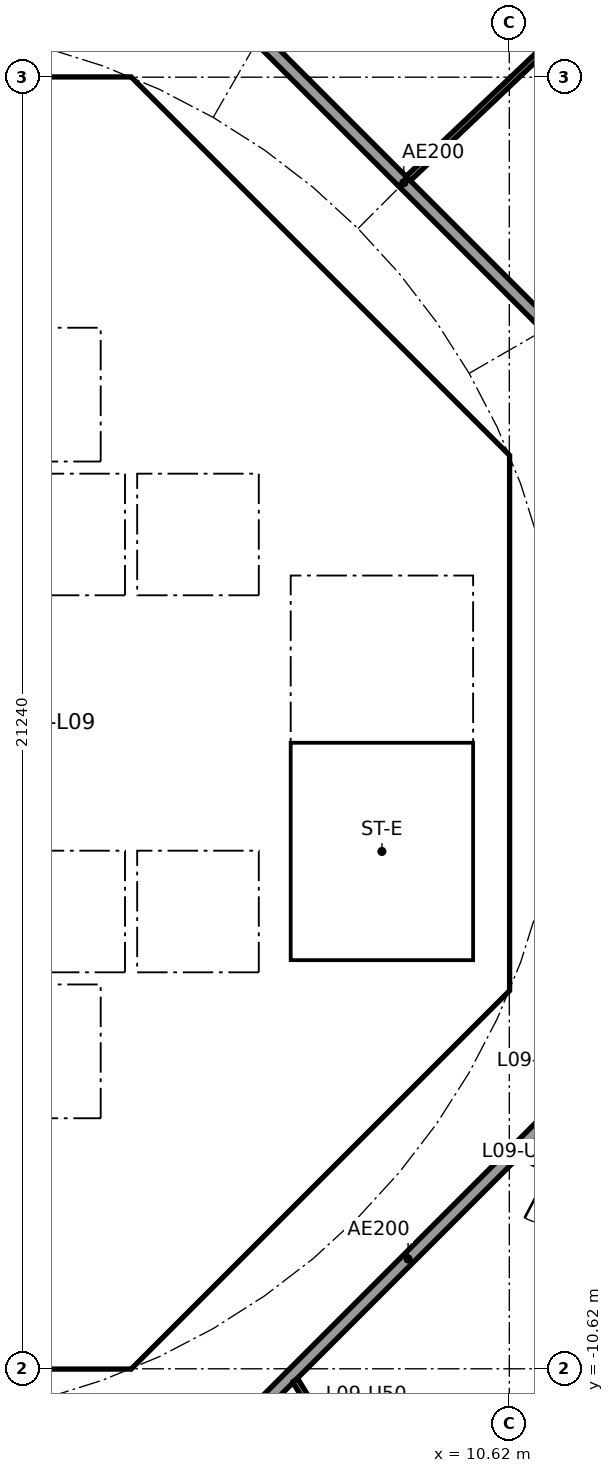
"""IFC4 building model, lengths in metres.
Left out: names, types, materials, properties, quantities, classifications, styles, units other than length and angle.
Written with IfcOpenShell. Run it as: python <this file> out.ifc"""

import sys

from ifc_helpers import new_model, si_unit, direction, frame, frame_2d, origin, place, context, subcontext, project, spatial, polyline, rectangle, outline, extrude, element, fill, save


model = new_model("IFC4")
c1 = context("Model", 3, precision=1e-05, world=origin(), true_north=direction((0.0, 1.0)))
c2 = subcontext(c1, "Body", "Model", "MODEL_VIEW")
j1 = project(units=[si_unit("LENGTHUNIT", "METRE"), si_unit("PLANEANGLEUNIT", "RADIAN")], contexts=[c1])
p1 = place(None, origin())
s1 = spatial("IfcSite", under=j1, at=p1, CompositionType="ELEMENT")
p2 = place(p1, origin())
s2 = spatial("IfcBuilding", under=s1, at=p2, CompositionType="ELEMENT")
p3 = place(p2, frame((0.0, 0.0, 41.8)))
s3 = spatial("IfcBuildingStorey", under=s2, at=p3, CompositionType="ELEMENT", Elevation=41.8)
p4 = place(p3, frame((9.988, 4.613, 0.0), z_axis=(0.0, 0.0, 1.0), x_axis=(-0.707106781187, 0.707106781187, 0.0)))
e1 = element("IfcWall", 1, at=p4, inside=s3, PredefinedType="SHEAR", context=c2, shape_type="SweptSolid", body=[
    extrude(rectangle(XDim=7.602, YDim=0.6, at=frame_2d((3.801, 0.0))), origin(), (0.0, 0.0, 1.0), 3.44),
])
p5 = place(p4, frame((3.201, 0.0, 0.0)))
e2 = element("IfcOpeningElement", 2, at=p5, cuts=e1, PredefinedType="OPENING", context=c2, shape_type="SweptSolid", body=[
    extrude(rectangle(XDim=1.2, YDim=2.1, at=frame_2d((0.6, 1.05))), frame((0.0, 0.31, 0.0), z_axis=(0.0, -1.0, 0.0), x_axis=(1.0, 0.0, 0.0)), (0.0, 0.0, 1.0), 0.62),
])
p6 = place(p3, frame((4.613, -9.988, 0.0), z_axis=(0.0, 0.0, 1.0), x_axis=(0.707106781187, 0.707106781187, 0.0)))
e3 = element("IfcWall", 3, at=p6, inside=s3, PredefinedType="SHEAR", context=c2, shape_type="SweptSolid", body=[
    extrude(rectangle(XDim=7.602, YDim=0.6, at=frame_2d((3.801, 0.0))), origin(), (0.0, 0.0, 1.0), 3.44),
])
p7 = place(p6, frame((3.201, 0.0, 0.0)))
e4 = element("IfcOpeningElement", 4, at=p7, cuts=e3, PredefinedType="OPENING", context=c2, shape_type="SweptSolid", body=[
    extrude(rectangle(XDim=1.2, YDim=2.1, at=frame_2d((0.6, 1.05))), frame((0.0, 0.31, 0.0), z_axis=(0.0, -1.0, 0.0), x_axis=(1.0, 0.0, 0.0)), (0.0, 0.0, 1.0), 0.62),
])
p8 = place(p3, frame((4.0, 4.3, 0.0), z_axis=(0.0, 0.0, 1.0), x_axis=(0.0, 1.0, 0.0)))
e5 = element("IfcWall", 5, at=p8, inside=s3, PredefinedType="SOLIDWALL", context=c2, shape_type="SweptSolid", body=[
    extrude(rectangle(XDim=2.2, YDim=0.2, at=frame_2d((1.1, 0.0))), origin(), (0.0, 0.0, 1.0), 3.44),
])
p9 = place(p8, frame((0.55, 0.0, 0.0)))
e6 = element("IfcOpeningElement", 6, at=p9, cuts=e5, PredefinedType="OPENING", context=c2, shape_type="SweptSolid", body=[
    extrude(rectangle(XDim=1.1, YDim=2.1, at=frame_2d((0.55, 1.05))), frame((0.0, 0.11, 0.0), z_axis=(0.0, -1.0, 0.0), x_axis=(1.0, 0.0, 0.0)), (0.0, 0.0, 1.0), 0.22),
])
p10 = place(p3, frame((-6.7, 2.0, 0.0), z_axis=(0.0, 0.0, 1.0), x_axis=(1.0, 0.0, 0.0)))
e7 = element("IfcWall", 7, at=p10, inside=s3, PredefinedType="SOLIDWALL", context=c2, shape_type="SweptSolid", body=[
    extrude(rectangle(XDim=13.4, YDim=0.2, at=frame_2d((6.7, 0.0))), origin(), (0.0, 0.0, 1.0), 3.44),
])
p11 = place(p10, frame((0.65, 0.0, 0.0)))
e8 = element("IfcOpeningElement", 8, at=p11, cuts=e7, PredefinedType="OPENING", context=c2, shape_type="SweptSolid", body=[
    extrude(rectangle(XDim=1.1, YDim=2.1, at=frame_2d((0.55, 1.05))), frame((0.0, 0.11, 0.0), z_axis=(0.0, -1.0, 0.0), x_axis=(1.0, 0.0, 0.0)), (0.0, 0.0, 1.0), 0.22),
])
p12 = place(p10, frame((2.85, 0.0, 0.0)))
e9 = element("IfcOpeningElement", 9, at=p12, cuts=e7, PredefinedType="OPENING", context=c2, shape_type="SweptSolid", body=[
    extrude(rectangle(XDim=1.1, YDim=2.1, at=frame_2d((0.55, 1.05))), frame((0.0, 0.11, 0.0), z_axis=(0.0, -1.0, 0.0), x_axis=(1.0, 0.0, 0.0)), (0.0, 0.0, 1.0), 0.22),
])
p13 = place(p10, frame((5.05, 0.0, 0.0)))
e10 = element("IfcOpeningElement", 10, at=p13, cuts=e7, PredefinedType="OPENING", context=c2, shape_type="SweptSolid", body=[
    extrude(rectangle(XDim=1.1, YDim=2.1, at=frame_2d((0.55, 1.05))), frame((0.0, 0.11, 0.0), z_axis=(0.0, -1.0, 0.0), x_axis=(1.0, 0.0, 0.0)), (0.0, 0.0, 1.0), 0.22),
])
p14 = place(p3, frame((6.7, 4.0, 0.0), z_axis=(0.0, 0.0, 1.0), x_axis=(1.0, 0.0, 0.0)))
e11 = element("IfcWall", 11, at=p14, inside=s3, PredefinedType="SOLIDWALL", context=c2, shape_type="SweptSolid", body=[
    extrude(rectangle(XDim=3.325, YDim=0.2, at=frame_2d((1.662, 0.0))), origin(), (0.0, 0.0, 1.0), 3.44),
])
p15 = place(p14, frame((1.25, 0.0, 0.0)))
e12 = element("IfcOpeningElement", 12, at=p15, cuts=e11, PredefinedType="OPENING", context=c2, shape_type="SweptSolid", body=[
    extrude(rectangle(XDim=1.1, YDim=2.1, at=frame_2d((0.55, 1.05))), frame((0.0, 0.11, 0.0), z_axis=(0.0, -1.0, 0.0), x_axis=(1.0, 0.0, 0.0)), (0.0, 0.0, 1.0), 0.22),
])
p16 = place(p3, frame((4.0, 7.025, 0.0), z_axis=(0.0, 0.0, 1.0), x_axis=(0.0, 1.0, 0.0)))
e13 = element("IfcWall", 13, at=p16, inside=s3, PredefinedType="SOLIDWALL", context=c2, shape_type="SweptSolid", body=[
    extrude(rectangle(XDim=3.0, YDim=0.2, at=frame_2d((1.5, 0.0))), origin(), (0.0, 0.0, 1.0), 3.44),
])
p17 = place(p16, frame((0.925, 0.0, 0.0)))
e14 = element("IfcOpeningElement", 14, at=p17, cuts=e13, PredefinedType="OPENING", context=c2, shape_type="SweptSolid", body=[
    extrude(rectangle(XDim=1.1, YDim=2.1, at=frame_2d((0.55, 1.05))), frame((0.0, 0.11, 0.0), z_axis=(0.0, -1.0, 0.0), x_axis=(1.0, 0.0, 0.0)), (0.0, 0.0, 1.0), 0.22),
])
p18 = place(p3, frame((4.0, -10.025, 0.0), z_axis=(0.0, 0.0, 1.0), x_axis=(0.0, 1.0, 0.0)))
e15 = element("IfcWall", 15, at=p18, inside=s3, PredefinedType="SOLIDWALL", context=c2, shape_type="SweptSolid", body=[
    extrude(rectangle(XDim=3.0, YDim=0.2, at=frame_2d((1.5, 0.0))), origin(), (0.0, 0.0, 1.0), 3.44),
])
p19 = place(p18, frame((0.975, 0.0, 0.0)))
e16 = element("IfcOpeningElement", 16, at=p19, cuts=e15, PredefinedType="OPENING", context=c2, shape_type="SweptSolid", body=[
    extrude(rectangle(XDim=1.1, YDim=2.1, at=frame_2d((0.55, 1.05))), frame((0.0, 0.11, 0.0), z_axis=(0.0, -1.0, 0.0), x_axis=(1.0, 0.0, 0.0)), (0.0, 0.0, 1.0), 0.22),
])
p20 = place(p3, frame((4.0, -6.5, 0.0), z_axis=(0.0, 0.0, 1.0), x_axis=(0.0, 1.0, 0.0)))
e17 = element("IfcWall", 17, at=p20, inside=s3, PredefinedType="SOLIDWALL", context=c2, shape_type="SweptSolid", body=[
    extrude(rectangle(XDim=2.2, YDim=0.2, at=frame_2d((1.1, 0.0))), origin(), (0.0, 0.0, 1.0), 3.44),
])
p21 = place(p20, frame((0.55, 0.0, 0.0)))
e18 = element("IfcOpeningElement", 18, at=p21, cuts=e17, PredefinedType="OPENING", context=c2, shape_type="SweptSolid", body=[
    extrude(rectangle(XDim=1.1, YDim=2.1, at=frame_2d((0.55, 1.05))), frame((0.0, 0.11, 0.0), z_axis=(0.0, -1.0, 0.0), x_axis=(1.0, 0.0, 0.0)), (0.0, 0.0, 1.0), 0.22),
])
p22 = place(p3, frame((-6.7, -2.0, 0.0), z_axis=(0.0, 0.0, 1.0), x_axis=(1.0, 0.0, 0.0)))
e19 = element("IfcWall", 19, at=p22, inside=s3, PredefinedType="SOLIDWALL", context=c2, shape_type="SweptSolid", body=[
    extrude(rectangle(XDim=13.4, YDim=0.2, at=frame_2d((6.7, 0.0))), origin(), (0.0, 0.0, 1.0), 3.44),
])
p23 = place(p22, frame((0.65, 0.0, 0.0)))
e20 = element("IfcOpeningElement", 20, at=p23, cuts=e19, PredefinedType="OPENING", context=c2, shape_type="SweptSolid", body=[
    extrude(rectangle(XDim=1.1, YDim=2.1, at=frame_2d((0.55, 1.05))), frame((0.0, 0.11, 0.0), z_axis=(0.0, -1.0, 0.0), x_axis=(1.0, 0.0, 0.0)), (0.0, 0.0, 1.0), 0.22),
])
p24 = place(p22, frame((2.85, 0.0, 0.0)))
e21 = element("IfcOpeningElement", 21, at=p24, cuts=e19, PredefinedType="OPENING", context=c2, shape_type="SweptSolid", body=[
    extrude(rectangle(XDim=1.1, YDim=2.1, at=frame_2d((0.55, 1.05))), frame((0.0, 0.11, 0.0), z_axis=(0.0, -1.0, 0.0), x_axis=(1.0, 0.0, 0.0)), (0.0, 0.0, 1.0), 0.22),
])
p25 = place(p3, origin())
e22 = element("IfcWall", 22, at=p25, inside=s3, PredefinedType="SHEAR", context=c2, shape_type="SweptSolid", body=[
    extrude(outline(polyline([(-4.152, -10.025), (4.152, -10.025), (4.401, -9.776), (4.825, -10.2), (4.401, -10.625), (-4.401, -10.625), (-4.825, -10.2), (-4.401, -9.776), (-4.152, -10.025)])), origin(), (0.0, 0.0, 1.0), 3.44),
])
p26 = place(p3, origin())
e23 = element("IfcWall", 23, at=p26, inside=s3, PredefinedType="SHEAR", context=c2, shape_type="SweptSolid", body=[
    extrude(outline(polyline([(-4.152, 10.025), (-4.401, 9.776), (-4.825, 10.2), (-4.401, 10.625), (4.401, 10.625), (4.825, 10.2), (4.401, 9.776), (4.152, 10.025), (-4.152, 10.025)])), origin(), (0.0, 0.0, 1.0), 3.44),
])
p27 = place(p3, origin())
e24 = element("IfcWall", 24, at=p27, inside=s3, PredefinedType="SHEAR", context=c2, shape_type="SweptSolid", body=[
    extrude(outline(polyline([(9.776, -4.401), (10.025, -4.152), (10.025, -3.801), (10.025, 4.152), (9.776, 4.401), (10.2, 4.825), (10.625, 4.401), (10.625, -4.401), (10.2, -4.825), (9.776, -4.401)])), origin(), (0.0, 0.0, 1.0), 3.44),
])
p28 = place(p3, origin())
e25 = element("IfcWall", 25, at=p28, inside=s3, PredefinedType="SOLIDWALL", context=c2, shape_type="SweptSolid", body=[
    extrude(outline(polyline([(-6.7, -2.1), (-6.5, -2.1), (-6.5, -4.1), (-4.5, -4.1), (-4.5, -2.1), (-4.3, -2.1), (-4.3, -4.1), (-2.3, -4.1), (-2.3, -2.1), (-2.1, -2.1), (-2.1, -4.1), (-0.1, -4.1), (-0.1, -2.1), (0.1, -2.1), (0.1, -4.1), (2.1, -4.1), (2.1, -2.1), (2.3, -2.1), (2.3, -4.1), (4.3, -4.1), (4.3, -2.1), (4.5, -2.1), (4.5, -4.1), (6.5, -4.1), (6.5, -2.1), (6.7, -2.1), (6.7, -4.3), (-6.7, -4.3), (-6.7, -2.1)])), origin(), (0.0, 0.0, 1.0), 3.44),
])
p29 = place(p3, origin())
e26 = element("IfcWall", 26, at=p29, inside=s3, PredefinedType="SOLIDWALL", context=c2, shape_type="SweptSolid", body=[
    extrude(outline(polyline([(-6.5, 2.1), (-6.7, 2.1), (-6.7, 4.3), (6.7, 4.3), (6.7, 2.1), (6.5, 2.1), (6.5, 4.1), (4.5, 4.1), (4.5, 2.1), (4.3, 2.1), (4.3, 4.1), (2.3, 4.1), (2.3, 2.1), (2.1, 2.1), (2.1, 4.1), (0.1, 4.1), (0.1, 2.1), (-0.1, 2.1), (-0.1, 4.1), (-2.1, 4.1), (-2.1, 2.1), (-2.3, 2.1), (-2.3, 4.1), (-4.3, 4.1), (-4.3, 2.1), (-4.5, 2.1), (-4.5, 4.1), (-6.5, 4.1), (-6.5, 2.1)])), origin(), (0.0, 0.0, 1.0), 3.44),
])
p30 = place(p3, origin())
e27 = element("IfcWall", 27, at=p30, inside=s3, PredefinedType="SOLIDWALL", context=c2, shape_type="SweptSolid", body=[
    extrude(outline(polyline([(4.1, -7.025), (-4.1, -7.025), (-4.1, -6.5), (4.1, -6.5), (4.1, -7.025)])), origin(), (0.0, 0.0, 1.0), 3.44),
])
p31 = place(p3, origin())
e28 = element("IfcWall", 28, at=p31, inside=s3, PredefinedType="SOLIDWALL", context=c2, shape_type="SweptSolid", body=[
    extrude(outline(polyline([(4.1, 6.5), (-4.1, 6.5), (-4.1, 7.025), (4.1, 7.025), (4.1, 6.5)])), origin(), (0.0, 0.0, 1.0), 3.44),
])
p32 = place(p3, origin())
e29 = element("IfcWall", 29, at=p32, inside=s3, PredefinedType="SOLIDWALL", context=c2, shape_type="SweptSolid", body=[
    extrude(outline(polyline([(7.025, -3.9), (6.7, -3.9), (6.7, 3.9), (7.025, 3.9), (7.025, -3.9)])), origin(), (0.0, 0.0, 1.0), 3.44),
])
p33 = place(p3, origin())
e30 = element("IfcWall", 30, at=p33, inside=s3, PredefinedType="SOLIDWALL", context=c2, shape_type="SweptSolid", body=[
    extrude(outline(polyline([(10.025, -4.1), (6.7, -4.1), (6.7, -3.9), (10.025, -3.9), (10.025, -4.1)])), origin(), (0.0, 0.0, 1.0), 3.44),
])
p34 = place(p3, frame((12.635, 5.134, 0.0), z_axis=(0.0, 0.0, 1.0), x_axis=(-0.707106781187, 0.707106781187, 0.0)))
e31 = element("IfcWall", 31, at=p34, inside=s3, PredefinedType="PARTITIONING", context=c2, shape_type="SweptSolid", body=[
    extrude(rectangle(XDim=10.609, YDim=0.2, at=frame_2d((5.305, 0.0))), origin(), (0.0, 0.0, 1.0), 3.44),
])
p35 = place(p3, frame((5.275, -12.494, 0.0), z_axis=(0.0, 0.0, 1.0), x_axis=(0.707106781187, 0.707106781187, 0.0)))
e32 = element("IfcWall", 32, at=p35, inside=s3, PredefinedType="PARTITIONING", context=c2, shape_type="SweptSolid", body=[
    extrude(rectangle(XDim=10.409, YDim=0.2, at=frame_2d((5.205, 0.0))), origin(), (0.0, 0.0, 1.0), 3.44),
])
p36 = place(p35, frame((8.508, 0.0, 0.0)))
e33 = element("IfcOpeningElement", 33, at=p36, cuts=e32, PredefinedType="OPENING", context=c2, shape_type="SweptSolid", body=[
    extrude(rectangle(XDim=1.0, YDim=2.1, at=frame_2d((0.5, 1.05))), frame((0.0, 0.11, 0.0), z_axis=(0.0, -1.0, 0.0), x_axis=(1.0, 0.0, 0.0)), (0.0, 0.0, 1.0), 0.22),
])
p37 = place(p3, frame((8.957, 8.953, 0.0), z_axis=(0.0, 0.0, 1.0), x_axis=(0.725250022034, 0.688485588476, 0.0)))
e34 = element("IfcWall", 34, at=p37, inside=s3, PredefinedType="PARTITIONING", context=c2, shape_type="SweptSolid", body=[
    extrude(rectangle(XDim=12.963, YDim=0.1, at=frame_2d((6.481, 0.0))), origin(), (0.0, 0.0, 1.0), 2.687),
])
p38 = place(p37, frame((8.79, 0.0, 0.0)))
e35 = element("IfcOpeningElement", 35, at=p38, cuts=e34, PredefinedType="OPENING", context=c2, shape_type="SweptSolid", body=[
    extrude(rectangle(XDim=0.9, YDim=2.1, at=frame_2d((0.45, 1.05))), frame((0.0, 0.06, 0.0), z_axis=(0.0, -1.0, 0.0), x_axis=(1.0, 0.0, 0.0)), (0.0, 0.0, 1.0), 0.12),
])
p39 = place(p3, frame((7.097, -10.81, 0.0), z_axis=(0.0, 0.0, 1.0), x_axis=(0.526453266471, -0.850204068576, 0.0)))
e36 = element("IfcWall", 36, at=p39, inside=s3, PredefinedType="PARTITIONING", context=c2, shape_type="SweptSolid", body=[
    extrude(rectangle(XDim=19.85, YDim=0.1, at=frame_2d((9.925, 0.0))), origin(), (0.0, 0.0, 1.0), 2.687),
])
p40 = place(p39, frame((0.35, 0.0, 0.0)))
e37 = element("IfcOpeningElement", 37, at=p40, cuts=e36, PredefinedType="OPENING", context=c2, shape_type="SweptSolid", body=[
    extrude(rectangle(XDim=0.9, YDim=2.1, at=frame_2d((0.45, 1.05))), frame((0.0, 0.06, 0.0), z_axis=(0.0, -1.0, 0.0), x_axis=(1.0, 0.0, 0.0)), (0.0, 0.0, 1.0), 0.12),
])
p41 = place(p39, frame((8.795, 0.0, 0.0)))
e38 = element("IfcOpeningElement", 38, at=p41, cuts=e36, PredefinedType="OPENING", context=c2, shape_type="SweptSolid", body=[
    extrude(rectangle(XDim=0.9, YDim=2.1, at=frame_2d((0.45, 1.05))), frame((0.0, 0.06, 0.0), z_axis=(0.0, -1.0, 0.0), x_axis=(1.0, 0.0, 0.0)), (0.0, 0.0, 1.0), 0.12),
])
p42 = place(p39, frame((15.935, 0.0, 0.0)))
e39 = element("IfcOpeningElement", 39, at=p42, cuts=e36, PredefinedType="OPENING", context=c2, shape_type="SweptSolid", body=[
    extrude(rectangle(XDim=0.9, YDim=2.1, at=frame_2d((0.45, 1.05))), frame((0.0, 0.06, 0.0), z_axis=(0.0, -1.0, 0.0), x_axis=(1.0, 0.0, 0.0)), (0.0, 0.0, 1.0), 0.12),
])
p43 = place(p3, frame((10.813, -7.091, 0.0), z_axis=(0.0, 0.0, 1.0), x_axis=(0.885182649479, -0.465243674928, 0.0)))
e40 = element("IfcWall", 40, at=p43, inside=s3, PredefinedType="PARTITIONING", context=c2, shape_type="SweptSolid", body=[
    extrude(rectangle(XDim=12.551, YDim=0.1, at=frame_2d((6.275, 0.0))), origin(), (0.0, 0.0, 1.0), 2.687),
])
p44 = place(p43, frame((0.539, 0.0, 0.0)))
e41 = element("IfcOpeningElement", 41, at=p44, cuts=e40, PredefinedType="OPENING", context=c2, shape_type="SweptSolid", body=[
    extrude(rectangle(XDim=0.9, YDim=2.1, at=frame_2d((0.45, 1.05))), frame((0.0, 0.06, 0.0), z_axis=(0.0, -1.0, 0.0), x_axis=(1.0, 0.0, 0.0)), (0.0, 0.0, 1.0), 0.12),
])
p45 = place(p43, frame((8.494, 0.0, 0.0)))
e42 = element("IfcOpeningElement", 42, at=p45, cuts=e40, PredefinedType="OPENING", context=c2, shape_type="SweptSolid", body=[
    extrude(rectangle(XDim=0.9, YDim=2.1, at=frame_2d((0.45, 1.05))), frame((0.0, 0.06, 0.0), z_axis=(0.0, -1.0, 0.0), x_axis=(1.0, 0.0, 0.0)), (0.0, 0.0, 1.0), 0.12),
])
p46 = place(p9, origin())
e43 = element("IfcDoor", 43, at=p46, inside=s3, OperationType="DOUBLE_DOOR_SLIDING", PredefinedType="DOOR", context=c2, shape_type="SweptSolid", body=[
    extrude(rectangle(XDim=1.1, YDim=2.1, at=frame_2d((0.55, 1.05))), frame((0.0, 0.025, 0.0), z_axis=(0.0, -1.0, 0.0), x_axis=(1.0, 0.0, 0.0)), (0.0, 0.0, 1.0), 0.05),
])
fill(e6, e43)
p47 = place(p21, origin())
e44 = element("IfcDoor", 44, at=p47, inside=s3, OperationType="DOUBLE_DOOR_SLIDING", PredefinedType="DOOR", context=c2, shape_type="SweptSolid", body=[
    extrude(rectangle(XDim=1.1, YDim=2.1, at=frame_2d((0.55, 1.05))), frame((0.0, 0.025, 0.0), z_axis=(0.0, -1.0, 0.0), x_axis=(1.0, 0.0, 0.0)), (0.0, 0.0, 1.0), 0.05),
])
fill(e18, e44)
p48 = place(p15, frame((1.1, 0.0, 0.0), x_axis=(-1.0, 0.0, 0.0)))
e45 = element("IfcDoor", 45, at=p48, inside=s3, OperationType="SINGLE_SWING_RIGHT", PredefinedType="DOOR", context=c2, shape_type="SweptSolid", body=[
    extrude(rectangle(XDim=1.1, YDim=2.1, at=frame_2d((0.55, 1.05))), frame((0.0, 0.025, 0.0), z_axis=(0.0, -1.0, 0.0), x_axis=(1.0, 0.0, 0.0)), (0.0, 0.0, 1.0), 0.05),
])
fill(e12, e45)
p49 = place(p17, origin())
e46 = element("IfcDoor", 46, at=p49, inside=s3, OperationType="SINGLE_SWING_LEFT", PredefinedType="DOOR", context=c2, shape_type="SweptSolid", body=[
    extrude(rectangle(XDim=1.1, YDim=2.1, at=frame_2d((0.55, 1.05))), frame((0.0, 0.025, 0.0), z_axis=(0.0, -1.0, 0.0), x_axis=(1.0, 0.0, 0.0)), (0.0, 0.0, 1.0), 0.05),
])
fill(e14, e46)
p50 = place(p19, origin())
e47 = element("IfcDoor", 47, at=p50, inside=s3, OperationType="SINGLE_SWING_RIGHT", PredefinedType="DOOR", context=c2, shape_type="SweptSolid", body=[
    extrude(rectangle(XDim=1.1, YDim=2.1, at=frame_2d((0.55, 1.05))), frame((0.0, 0.025, 0.0), z_axis=(0.0, -1.0, 0.0), x_axis=(1.0, 0.0, 0.0)), (0.0, 0.0, 1.0), 0.05),
])
fill(e16, e47)
p51 = place(p5, origin())
e48 = element("IfcDoor", 48, at=p51, inside=s3, OperationType="SINGLE_SWING_RIGHT", PredefinedType="DOOR", context=c2, shape_type="SweptSolid", body=[
    extrude(rectangle(XDim=1.2, YDim=2.1, at=frame_2d((0.6, 1.05))), frame((0.0, 0.025, 0.0), z_axis=(0.0, -1.0, 0.0), x_axis=(1.0, 0.0, 0.0)), (0.0, 0.0, 1.0), 0.05),
])
fill(e2, e48)
p52 = place(p7, origin())
e49 = element("IfcDoor", 49, at=p52, inside=s3, OperationType="SINGLE_SWING_RIGHT", PredefinedType="DOOR", context=c2, shape_type="SweptSolid", body=[
    extrude(rectangle(XDim=1.2, YDim=2.1, at=frame_2d((0.6, 1.05))), frame((0.0, 0.025, 0.0), z_axis=(0.0, -1.0, 0.0), x_axis=(1.0, 0.0, 0.0)), (0.0, 0.0, 1.0), 0.05),
])
fill(e4, e49)
save(model, sys.argv[1])
